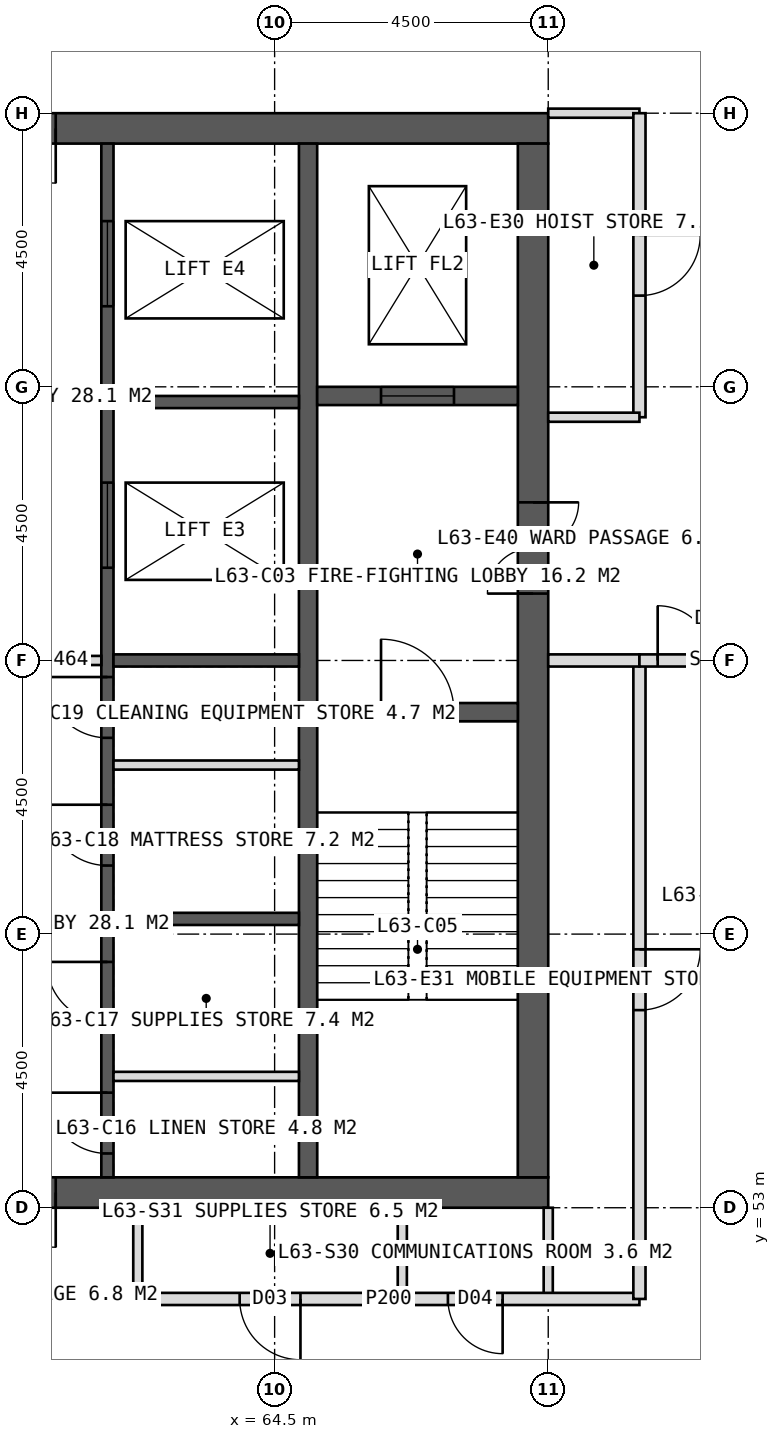
"""IFC4 building model, lengths in metres.
Left out: names, types, materials, properties, quantities, classifications, styles, units other than length and angle.
Written with IfcOpenShell. Run it as: python <this file> out.ifc"""

import sys

from ifc_helpers import new_model, si_unit, direction, frame, frame_2d, origin, place, context, subcontext, project, spatial, rectangle, extrude, element, fill, save


model = new_model("IFC4")
c1 = context("Model", 3, precision=1e-05, world=origin(), true_north=direction((0.0, 1.0)))
c2 = subcontext(c1, "Body", "Model", "MODEL_VIEW")
j1 = project(units=[si_unit("LENGTHUNIT", "METRE"), si_unit("PLANEANGLEUNIT", "RADIAN")], contexts=[c1])
p1 = place(None, origin())
s1 = spatial("IfcSite", under=j1, at=p1, CompositionType="ELEMENT")
p2 = place(p1, origin())
s2 = spatial("IfcBuilding", under=s1, at=p2, CompositionType="ELEMENT")
p3 = place(p2, frame((0.0, 0.0, 262.0)))
s3 = spatial("IfcBuildingStorey", under=s2, at=p3, CompositionType="ELEMENT", Elevation=262.0)
p4 = place(p3, frame((51.0, 70.75, 0.0), z_axis=(0.0, 0.0, 1.0), x_axis=(1.0, 0.0, 0.0)))
e1 = element("IfcWall", 1, at=p4, inside=s3, PredefinedType="SHEAR", context=c2, shape_type="SweptSolid", body=[
    extrude(rectangle(XDim=18.0, YDim=0.5, at=frame_2d((9.0, 0.0))), origin(), (0.0, 0.0, 1.0), 4.0),
])
p5 = place(p4, frame((8.1, 0.0, 0.0)))
e2 = element("IfcOpeningElement", 2, at=p5, cuts=e1, PredefinedType="OPENING", context=c2, shape_type="SweptSolid", body=[
    extrude(rectangle(XDim=1.8, YDim=2.2, at=frame_2d((0.9, 1.1))), frame((0.0, 0.26, 0.0), z_axis=(0.0, -1.0, 0.0), x_axis=(1.0, 0.0, 0.0)), (0.0, 0.0, 1.0), 0.52),
])
p6 = place(p3, frame((51.0, 53.25, 0.0), z_axis=(0.0, 0.0, 1.0), x_axis=(1.0, 0.0, 0.0)))
e3 = element("IfcWall", 3, at=p6, inside=s3, PredefinedType="SHEAR", context=c2, shape_type="SweptSolid", body=[
    extrude(rectangle(XDim=18.0, YDim=0.5, at=frame_2d((9.0, 0.0))), origin(), (0.0, 0.0, 1.0), 4.0),
])
p7 = place(p6, frame((8.1, 0.0, 0.0)))
e4 = element("IfcOpeningElement", 4, at=p7, cuts=e3, PredefinedType="OPENING", context=c2, shape_type="SweptSolid", body=[
    extrude(rectangle(XDim=1.8, YDim=2.2, at=frame_2d((0.9, 1.1))), frame((0.0, 0.26, 0.0), z_axis=(0.0, -1.0, 0.0), x_axis=(1.0, 0.0, 0.0)), (0.0, 0.0, 1.0), 0.52),
])
p8 = place(p3, frame((68.75, 53.5, 0.0), z_axis=(0.0, 0.0, 1.0), x_axis=(0.0, 1.0, 0.0)))
e5 = element("IfcWall", 5, at=p8, inside=s3, PredefinedType="SHEAR", context=c2, shape_type="SweptSolid", body=[
    extrude(rectangle(XDim=17.0, YDim=0.5, at=frame_2d((8.5, 0.0))), origin(), (0.0, 0.0, 1.0), 4.0),
])
p9 = place(p8, frame((9.6, 0.0, 0.0)))
e6 = element("IfcOpeningElement", 6, at=p9, cuts=e5, PredefinedType="OPENING", context=c2, shape_type="SweptSolid", body=[
    extrude(rectangle(XDim=1.5, YDim=2.2, at=frame_2d((0.75, 1.1))), frame((0.0, 0.26, 0.0), z_axis=(0.0, -1.0, 0.0), x_axis=(1.0, 0.0, 0.0)), (0.0, 0.0, 1.0), 0.52),
])
p10 = place(p3, frame((65.05, 53.5, 0.0), z_axis=(0.0, 0.0, 1.0), x_axis=(0.0, 1.0, 0.0)))
e7 = element("IfcWall", 7, at=p10, inside=s3, PredefinedType="SHEAR", context=c2, shape_type="SweptSolid", body=[
    extrude(rectangle(XDim=17.0, YDim=0.3, at=frame_2d((8.5, 0.0))), origin(), (0.0, 0.0, 1.0), 4.0),
])
p11 = place(p3, frame((61.75, 53.5, 0.0), z_axis=(0.0, 0.0, 1.0), x_axis=(0.0, 1.0, 0.0)))
e8 = element("IfcWall", 8, at=p11, inside=s3, PredefinedType="SHEAR", context=c2, shape_type="SweptSolid", body=[
    extrude(rectangle(XDim=17.0, YDim=0.2, at=frame_2d((8.5, 0.0))), origin(), (0.0, 0.0, 1.0), 4.0),
])
p12 = place(p11, frame((0.393, 0.0, 0.0)))
e9 = element("IfcOpeningElement", 9, at=p12, cuts=e8, PredefinedType="OPENING", context=c2, shape_type="SweptSolid", body=[
    extrude(rectangle(XDim=1.0, YDim=2.1, at=frame_2d((0.5, 1.05))), frame((0.0, 0.11, 0.0), z_axis=(0.0, -1.0, 0.0), x_axis=(1.0, 0.0, 0.0)), (0.0, 0.0, 1.0), 0.22),
])
p13 = place(p11, frame((2.542, 0.0, 0.0)))
e10 = element("IfcOpeningElement", 10, at=p13, cuts=e8, PredefinedType="OPENING", context=c2, shape_type="SweptSolid", body=[
    extrude(rectangle(XDim=1.0, YDim=2.1, at=frame_2d((0.5, 1.05))), frame((0.0, 0.11, 0.0), z_axis=(0.0, -1.0, 0.0), x_axis=(1.0, 0.0, 0.0)), (0.0, 0.0, 1.0), 0.22),
])
p14 = place(p11, frame((5.127, 0.0, 0.0)))
e11 = element("IfcOpeningElement", 11, at=p14, cuts=e8, PredefinedType="OPENING", context=c2, shape_type="SweptSolid", body=[
    extrude(rectangle(XDim=1.0, YDim=2.1, at=frame_2d((0.5, 1.05))), frame((0.0, 0.11, 0.0), z_axis=(0.0, -1.0, 0.0), x_axis=(1.0, 0.0, 0.0)), (0.0, 0.0, 1.0), 0.22),
])
p15 = place(p11, frame((7.228, 0.0, 0.0)))
e12 = element("IfcOpeningElement", 12, at=p15, cuts=e8, PredefinedType="OPENING", context=c2, shape_type="SweptSolid", body=[
    extrude(rectangle(XDim=1.0, YDim=2.1, at=frame_2d((0.5, 1.05))), frame((0.0, 0.11, 0.0), z_axis=(0.0, -1.0, 0.0), x_axis=(1.0, 0.0, 0.0)), (0.0, 0.0, 1.0), 0.22),
])
p16 = place(p11, frame((10.025, 0.0, 0.0)))
e13 = element("IfcOpeningElement", 13, at=p16, cuts=e8, PredefinedType="OPENING", context=c2, shape_type="SweptSolid", body=[
    extrude(rectangle(XDim=1.4, YDim=2.2, at=frame_2d((0.7, 1.1))), frame((0.0, 0.11, 0.0), z_axis=(0.0, -1.0, 0.0), x_axis=(1.0, 0.0, 0.0)), (0.0, 0.0, 1.0), 0.22),
])
p17 = place(p11, frame((14.325, 0.0, 0.0)))
e14 = element("IfcOpeningElement", 14, at=p17, cuts=e8, PredefinedType="OPENING", context=c2, shape_type="SweptSolid", body=[
    extrude(rectangle(XDim=1.4, YDim=2.2, at=frame_2d((0.7, 1.1))), frame((0.0, 0.11, 0.0), z_axis=(0.0, -1.0, 0.0), x_axis=(1.0, 0.0, 0.0)), (0.0, 0.0, 1.0), 0.22),
])
for number, where, z_axis, x_axis in (
    (15, (61.85, 57.75, 0.0), (0.0, 0.0, 1.0), (1.0, 0.0, 0.0)),
    (16, (61.85, 62.0, 0.0), (0.0, 0.0, 1.0), (1.0, 0.0, 0.0)),
    (17, (61.85, 66.25, 0.0), (0.0, 0.0, 1.0), (1.0, 0.0, 0.0)),
):
    element("IfcWall", number, at=place(p3, frame(where, z_axis=z_axis, x_axis=x_axis)), inside=s3, PredefinedType="SHEAR", context=c2, shape_type="SweptSolid", body=[
        extrude(rectangle(XDim=3.05, YDim=0.2, at=frame_2d((1.525, 0.0))), origin(), (0.0, 0.0, 1.0), 4.0),
    ])
p18 = place(p3, frame((65.2, 61.15, 0.0), z_axis=(0.0, 0.0, 1.0), x_axis=(1.0, 0.0, 0.0)))
e18 = element("IfcWall", 18, at=p18, inside=s3, PredefinedType="SHEAR", context=c2, shape_type="SweptSolid", body=[
    extrude(rectangle(XDim=3.3, YDim=0.3, at=frame_2d((1.65, 0.0))), origin(), (0.0, 0.0, 1.0), 4.0),
])
p19 = place(p18, frame((1.05, 0.0, 0.0)))
e19 = element("IfcOpeningElement", 19, at=p19, cuts=e18, PredefinedType="OPENING", context=c2, shape_type="SweptSolid", body=[
    extrude(rectangle(XDim=1.2, YDim=2.1, at=frame_2d((0.6, 1.05))), frame((0.0, 0.16, 0.0), z_axis=(0.0, -1.0, 0.0), x_axis=(1.0, 0.0, 0.0)), (0.0, 0.0, 1.0), 0.32),
])
p20 = place(p3, frame((65.2, 66.35, 0.0), z_axis=(0.0, 0.0, 1.0), x_axis=(1.0, 0.0, 0.0)))
e20 = element("IfcWall", 20, at=p20, inside=s3, PredefinedType="SHEAR", context=c2, shape_type="SweptSolid", body=[
    extrude(rectangle(XDim=3.3, YDim=0.3, at=frame_2d((1.65, 0.0))), origin(), (0.0, 0.0, 1.0), 4.0),
])
p21 = place(p20, frame((1.05, 0.0, 0.0)))
e21 = element("IfcOpeningElement", 21, at=p21, cuts=e20, PredefinedType="OPENING", context=c2, shape_type="SweptSolid", body=[
    extrude(rectangle(XDim=1.2, YDim=2.2, at=frame_2d((0.6, 1.1))), frame((0.0, 0.16, 0.0), z_axis=(0.0, -1.0, 0.0), x_axis=(1.0, 0.0, 0.0)), (0.0, 0.0, 1.0), 0.32),
])
p22 = place(p3, frame((69.0, 53.0, 0.0), z_axis=(0.0, 0.0, 1.0), x_axis=(0.0, -1.0, 0.0)))
e22 = element("IfcWall", 22, at=p22, inside=s3, PredefinedType="PARTITIONING", context=c2, shape_type="SweptSolid", body=[
    extrude(rectangle(XDim=1.5, YDim=0.15, at=frame_2d((0.75, 0.0))), origin(), (0.0, 0.0, 1.0), 3.75),
])
p23 = place(p3, frame((70.5, 51.5, 0.0), z_axis=(0.0, 0.0, 1.0), x_axis=(-1.0, 0.0, 0.0)))
e23 = element("IfcWall", 23, at=p23, inside=s3, PredefinedType="PARTITIONING", context=c2, shape_type="SweptSolid", body=[
    extrude(rectangle(XDim=8.25, YDim=0.2, at=frame_2d((4.125, 0.0))), origin(), (0.0, 0.0, 1.0), 3.75),
])
p24 = place(p23, frame((2.25, 0.0, 0.0)))
e24 = element("IfcOpeningElement", 24, at=p24, cuts=e23, PredefinedType="OPENING", context=c2, shape_type="SweptSolid", body=[
    extrude(rectangle(XDim=0.9, YDim=2.1, at=frame_2d((0.45, 1.05))), frame((0.0, 0.11, 0.0), z_axis=(0.0, -1.0, 0.0), x_axis=(1.0, 0.0, 0.0)), (0.0, 0.0, 1.0), 0.22),
])
p25 = place(p23, frame((5.575, 0.0, 0.0)))
e25 = element("IfcOpeningElement", 25, at=p25, cuts=e23, PredefinedType="OPENING", context=c2, shape_type="SweptSolid", body=[
    extrude(rectangle(XDim=1.0, YDim=2.1, at=frame_2d((0.5, 1.05))), frame((0.0, 0.11, 0.0), z_axis=(0.0, -1.0, 0.0), x_axis=(1.0, 0.0, 0.0)), (0.0, 0.0, 1.0), 0.22),
])
for number, where, z_axis, x_axis in (
    (26, (62.25, 53.0, 0.0), (0.0, 0.0, 1.0), (0.0, -1.0, 0.0)),
    (27, (66.6, 53.0, 0.0), (0.0, 0.0, 1.0), (0.0, -1.0, 0.0)),
    (28, (69.0, 71.0, 0.0), (0.0, 0.0, 1.0), (1.0, 0.0, 0.0)),
):
    element("IfcWall", number, at=place(p3, frame(where, z_axis=z_axis, x_axis=x_axis)), inside=s3, PredefinedType="PARTITIONING", context=c2, shape_type="SweptSolid", body=[
        extrude(rectangle(XDim=1.5, YDim=0.15, at=frame_2d((0.75, 0.0))), origin(), (0.0, 0.0, 1.0), 3.75),
    ])
p26 = place(p3, frame((70.5, 71.0, 0.0), z_axis=(0.0, 0.0, 1.0), x_axis=(0.0, -1.0, 0.0)))
e29 = element("IfcWall", 29, at=p26, inside=s3, PredefinedType="PARTITIONING", context=c2, shape_type="SweptSolid", body=[
    extrude(rectangle(XDim=5.0, YDim=0.2, at=frame_2d((2.5, 0.0))), origin(), (0.0, 0.0, 1.0), 3.75),
])
p27 = place(p26, frame((2.0, 0.0, 0.0)))
e30 = element("IfcOpeningElement", 30, at=p27, cuts=e29, PredefinedType="OPENING", context=c2, shape_type="SweptSolid", body=[
    extrude(rectangle(XDim=1.0, YDim=2.1, at=frame_2d((0.5, 1.05))), frame((0.0, 0.11, 0.0), z_axis=(0.0, -1.0, 0.0), x_axis=(1.0, 0.0, 0.0)), (0.0, 0.0, 1.0), 0.22),
])
p28 = place(p3, frame((70.5, 62.0, 0.0), z_axis=(0.0, 0.0, 1.0), x_axis=(0.0, -1.0, 0.0)))
e31 = element("IfcWall", 31, at=p28, inside=s3, PredefinedType="PARTITIONING", context=c2, shape_type="SweptSolid", body=[
    extrude(rectangle(XDim=10.5, YDim=0.2, at=frame_2d((5.25, 0.0))), origin(), (0.0, 0.0, 1.0), 3.75),
])
p29 = place(p28, frame((4.75, 0.0, 0.0)))
e32 = element("IfcOpeningElement", 32, at=p29, cuts=e31, PredefinedType="OPENING", context=c2, shape_type="SweptSolid", body=[
    extrude(rectangle(XDim=1.0, YDim=2.1, at=frame_2d((0.5, 1.05))), frame((0.0, 0.11, 0.0), z_axis=(0.0, -1.0, 0.0), x_axis=(1.0, 0.0, 0.0)), (0.0, 0.0, 1.0), 0.22),
])
p30 = place(p3, frame((69.0, 66.0, 0.0), z_axis=(0.0, 0.0, 1.0), x_axis=(1.0, 0.0, 0.0)))
e33 = element("IfcWall", 33, at=p30, inside=s3, PredefinedType="PARTITIONING", context=c2, shape_type="SweptSolid", body=[
    extrude(rectangle(XDim=1.5, YDim=0.15, at=frame_2d((0.75, 0.0))), origin(), (0.0, 0.0, 1.0), 3.75),
])
p31 = place(p3, frame((69.0, 62.0, 0.0), z_axis=(0.0, 0.0, 1.0), x_axis=(1.0, 0.0, 0.0)))
e34 = element("IfcWall", 34, at=p31, inside=s3, PredefinedType="SOLIDWALL", context=c2, shape_type="SweptSolid", body=[
    extrude(rectangle(XDim=1.5, YDim=0.2, at=frame_2d((0.75, 0.0))), origin(), (0.0, 0.0, 1.0), 2.75),
])
p32 = place(p3, frame((70.5, 62.0, 0.0), z_axis=(0.0, 0.0, 1.0), x_axis=(1.0, 0.0, 0.0)))
e35 = element("IfcWall", 35, at=p32, inside=s3, PredefinedType="SOLIDWALL", context=c2, shape_type="SweptSolid", body=[
    extrude(rectangle(XDim=2.6, YDim=0.2, at=frame_2d((1.3, 0.0))), origin(), (0.0, 0.0, 1.0), 2.75),
])
p33 = place(p32, frame((0.3, 0.0, 0.0)))
e36 = element("IfcOpeningElement", 36, at=p33, cuts=e35, PredefinedType="OPENING", context=c2, shape_type="SweptSolid", body=[
    extrude(rectangle(XDim=1.8, YDim=2.2, at=frame_2d((0.9, 1.1))), frame((0.0, 0.11, 0.0), z_axis=(0.0, -1.0, 0.0), x_axis=(1.0, 0.0, 0.0)), (0.0, 0.0, 1.0), 0.22),
])
for number, where, z_axis, x_axis in (
    (37, (61.85, 55.16, 0.0), (0.0, 0.0, 1.0), (1.0, 0.0, 0.0)),
    (38, (61.85, 60.28, 0.0), (0.0, 0.0, 1.0), (1.0, 0.0, 0.0)),
):
    element("IfcWall", number, at=place(p3, frame(where, z_axis=z_axis, x_axis=x_axis)), inside=s3, PredefinedType="PARTITIONING", context=c2, shape_type="SweptSolid", body=[
        extrude(rectangle(XDim=3.05, YDim=0.15, at=frame_2d((1.525, 0.0))), origin(), (0.0, 0.0, 1.0), 3.75),
    ])
p34 = place(p3, frame((58.35, 62.0, 0.0), z_axis=(0.0, 0.0, 1.0), x_axis=(1.0, 0.0, 0.0)))
e39 = element("IfcWall", 39, at=p34, inside=s3, PredefinedType="PARTITIONING", context=c2, shape_type="SweptSolid", body=[
    extrude(rectangle(XDim=3.3, YDim=0.15, at=frame_2d((1.65, 0.0))), origin(), (0.0, 0.0, 1.0), 3.75),
])
p35 = place(p24, origin())
e40 = element("IfcDoor", 40, at=p35, inside=s3, OperationType="SINGLE_SWING_LEFT", PredefinedType="DOOR", context=c2, shape_type="SweptSolid", body=[
    extrude(rectangle(XDim=0.9, YDim=2.1, at=frame_2d((0.45, 1.05))), frame((0.0, 0.025, 0.0), z_axis=(0.0, -1.0, 0.0), x_axis=(1.0, 0.0, 0.0)), (0.0, 0.0, 1.0), 0.05),
])
fill(e24, e40)
p36 = place(p25, origin())
e41 = element("IfcDoor", 41, at=p36, inside=s3, OperationType="SINGLE_SWING_LEFT", PredefinedType="DOOR", context=c2, shape_type="SweptSolid", body=[
    extrude(rectangle(XDim=1.0, YDim=2.1, at=frame_2d((0.5, 1.05))), frame((0.0, 0.025, 0.0), z_axis=(0.0, -1.0, 0.0), x_axis=(1.0, 0.0, 0.0)), (0.0, 0.0, 1.0), 0.05),
])
fill(e25, e41)
p37 = place(p27, origin())
e42 = element("IfcDoor", 42, at=p37, inside=s3, OperationType="SINGLE_SWING_LEFT", PredefinedType="DOOR", context=c2, shape_type="SweptSolid", body=[
    extrude(rectangle(XDim=1.0, YDim=2.1, at=frame_2d((0.5, 1.05))), frame((0.0, 0.025, 0.0), z_axis=(0.0, -1.0, 0.0), x_axis=(1.0, 0.0, 0.0)), (0.0, 0.0, 1.0), 0.05),
])
fill(e30, e42)
p38 = place(p29, origin())
e43 = element("IfcDoor", 43, at=p38, inside=s3, OperationType="SINGLE_SWING_LEFT", PredefinedType="DOOR", context=c2, shape_type="SweptSolid", body=[
    extrude(rectangle(XDim=1.0, YDim=2.1, at=frame_2d((0.5, 1.05))), frame((0.0, 0.025, 0.0), z_axis=(0.0, -1.0, 0.0), x_axis=(1.0, 0.0, 0.0)), (0.0, 0.0, 1.0), 0.05),
])
fill(e32, e43)
p39 = place(p33, origin())
e44 = element("IfcDoor", 44, at=p39, inside=s3, OperationType="DOUBLE_DOOR_DOUBLE_SWING", PredefinedType="DOOR", context=c2, shape_type="SweptSolid", body=[
    extrude(rectangle(XDim=1.8, YDim=2.2, at=frame_2d((0.9, 1.1))), frame((0.0, 0.025, 0.0), z_axis=(0.0, -1.0, 0.0), x_axis=(1.0, 0.0, 0.0)), (0.0, 0.0, 1.0), 0.05),
])
fill(e36, e44)
p40 = place(p5, origin())
e45 = element("IfcDoor", 45, at=p40, inside=s3, OperationType="DOUBLE_DOOR_SINGLE_SWING", PredefinedType="DOOR", context=c2, shape_type="SweptSolid", body=[
    extrude(rectangle(XDim=1.8, YDim=2.2, at=frame_2d((0.9, 1.1))), frame((0.0, 0.025, 0.0), z_axis=(0.0, -1.0, 0.0), x_axis=(1.0, 0.0, 0.0)), (0.0, 0.0, 1.0), 0.05),
])
fill(e2, e45)
p41 = place(p9, origin())
e46 = element("IfcDoor", 46, at=p41, inside=s3, OperationType="DOUBLE_DOOR_SINGLE_SWING", PredefinedType="DOOR", context=c2, shape_type="SweptSolid", body=[
    extrude(rectangle(XDim=1.5, YDim=2.2, at=frame_2d((0.75, 1.1))), frame((0.0, 0.025, 0.0), z_axis=(0.0, -1.0, 0.0), x_axis=(1.0, 0.0, 0.0)), (0.0, 0.0, 1.0), 0.05),
])
fill(e6, e46)
p42 = place(p19, origin())
e47 = element("IfcDoor", 47, at=p42, inside=s3, OperationType="SINGLE_SWING_LEFT", PredefinedType="DOOR", context=c2, shape_type="SweptSolid", body=[
    extrude(rectangle(XDim=1.2, YDim=2.1, at=frame_2d((0.6, 1.05))), frame((0.0, 0.025, 0.0), z_axis=(0.0, -1.0, 0.0), x_axis=(1.0, 0.0, 0.0)), (0.0, 0.0, 1.0), 0.05),
])
fill(e19, e47)
p43 = place(p21, origin())
e48 = element("IfcDoor", 48, at=p43, inside=s3, OperationType="SLIDING_TO_LEFT", PredefinedType="DOOR", context=c2, shape_type="SweptSolid", body=[
    extrude(rectangle(XDim=1.2, YDim=2.2, at=frame_2d((0.6, 1.1))), frame((0.0, 0.025, 0.0), z_axis=(0.0, -1.0, 0.0), x_axis=(1.0, 0.0, 0.0)), (0.0, 0.0, 1.0), 0.05),
])
fill(e21, e48)
p44 = place(p12, origin())
e49 = element("IfcDoor", 49, at=p44, inside=s3, OperationType="SINGLE_SWING_RIGHT", PredefinedType="DOOR", context=c2, shape_type="SweptSolid", body=[
    extrude(rectangle(XDim=1.0, YDim=2.1, at=frame_2d((0.5, 1.05))), frame((0.0, 0.025, 0.0), z_axis=(0.0, -1.0, 0.0), x_axis=(1.0, 0.0, 0.0)), (0.0, 0.0, 1.0), 0.05),
])
fill(e9, e49)
p45 = place(p13, origin())
e50 = element("IfcDoor", 50, at=p45, inside=s3, OperationType="SINGLE_SWING_RIGHT", PredefinedType="DOOR", context=c2, shape_type="SweptSolid", body=[
    extrude(rectangle(XDim=1.0, YDim=2.1, at=frame_2d((0.5, 1.05))), frame((0.0, 0.025, 0.0), z_axis=(0.0, -1.0, 0.0), x_axis=(1.0, 0.0, 0.0)), (0.0, 0.0, 1.0), 0.05),
])
fill(e10, e50)
p46 = place(p14, origin())
e51 = element("IfcDoor", 51, at=p46, inside=s3, OperationType="SINGLE_SWING_RIGHT", PredefinedType="DOOR", context=c2, shape_type="SweptSolid", body=[
    extrude(rectangle(XDim=1.0, YDim=2.1, at=frame_2d((0.5, 1.05))), frame((0.0, 0.025, 0.0), z_axis=(0.0, -1.0, 0.0), x_axis=(1.0, 0.0, 0.0)), (0.0, 0.0, 1.0), 0.05),
])
fill(e11, e51)
p47 = place(p15, origin())
e52 = element("IfcDoor", 52, at=p47, inside=s3, OperationType="SINGLE_SWING_RIGHT", PredefinedType="DOOR", context=c2, shape_type="SweptSolid", body=[
    extrude(rectangle(XDim=1.0, YDim=2.1, at=frame_2d((0.5, 1.05))), frame((0.0, 0.025, 0.0), z_axis=(0.0, -1.0, 0.0), x_axis=(1.0, 0.0, 0.0)), (0.0, 0.0, 1.0), 0.05),
])
fill(e12, e52)
p48 = place(p16, origin())
e53 = element("IfcDoor", 53, at=p48, inside=s3, OperationType="SLIDING_TO_LEFT", PredefinedType="DOOR", context=c2, shape_type="SweptSolid", body=[
    extrude(rectangle(XDim=1.4, YDim=2.2, at=frame_2d((0.7, 1.1))), frame((0.0, 0.025, 0.0), z_axis=(0.0, -1.0, 0.0), x_axis=(1.0, 0.0, 0.0)), (0.0, 0.0, 1.0), 0.05),
])
fill(e13, e53)
p49 = place(p17, origin())
e54 = element("IfcDoor", 54, at=p49, inside=s3, OperationType="SLIDING_TO_LEFT", PredefinedType="DOOR", context=c2, shape_type="SweptSolid", body=[
    extrude(rectangle(XDim=1.4, YDim=2.2, at=frame_2d((0.7, 1.1))), frame((0.0, 0.025, 0.0), z_axis=(0.0, -1.0, 0.0), x_axis=(1.0, 0.0, 0.0)), (0.0, 0.0, 1.0), 0.05),
])
fill(e14, e54)
p50 = place(p7, origin())
e55 = element("IfcDoor", 55, at=p50, inside=s3, OperationType="DOUBLE_DOOR_SINGLE_SWING", PredefinedType="DOOR", context=c2, shape_type="SweptSolid", body=[
    extrude(rectangle(XDim=1.8, YDim=2.2, at=frame_2d((0.9, 1.1))), frame((0.0, 0.025, 0.0), z_axis=(0.0, -1.0, 0.0), x_axis=(1.0, 0.0, 0.0)), (0.0, 0.0, 1.0), 0.05),
])
fill(e4, e55)
save(model, sys.argv[1])
